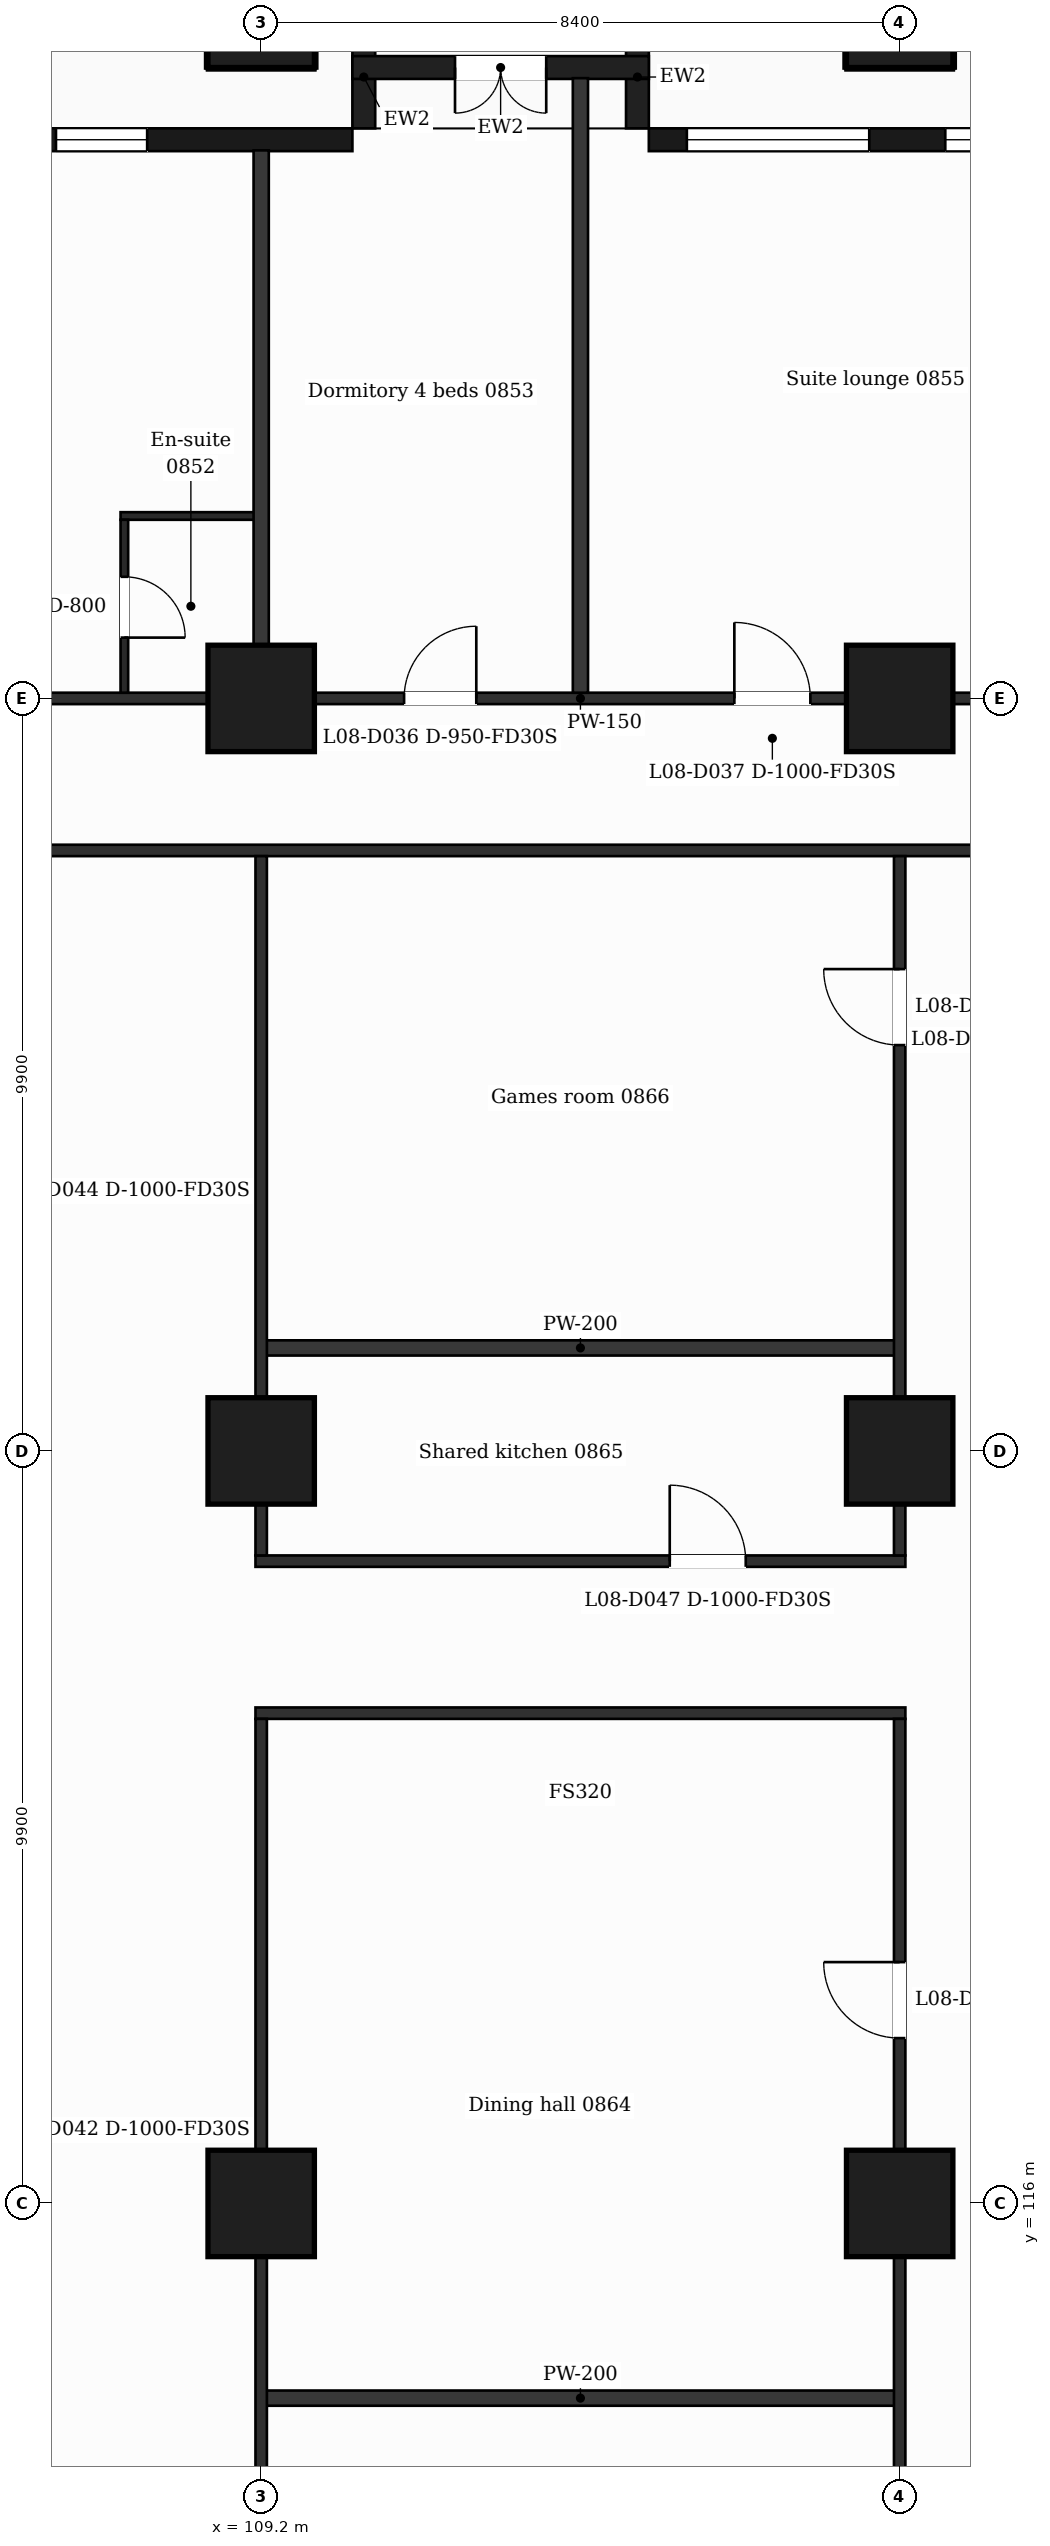
"""IFC4 building model, lengths in metres.
Left out: names, types, materials, properties, quantities, classifications, styles, units other than length and angle.
Written with IfcOpenShell. Run it as: python <this file> out.ifc"""

import sys

from ifc_helpers import new_model, si_unit, direction, frame, frame_2d, origin, origin_2d, place, context, subcontext, project, spatial, rectangle, extrude, element, fill, save


model = new_model("IFC4")
c1 = context("Model", 3, precision=1e-05, world=origin(), true_north=direction((0.0, 1.0)))
c2 = subcontext(c1, "Body", "Model", "MODEL_VIEW")
j1 = project(units=[si_unit("LENGTHUNIT", "METRE"), si_unit("PLANEANGLEUNIT", "RADIAN")], contexts=[c1])
p1 = place(None, origin())
s1 = spatial("IfcSite", under=j1, at=p1, CompositionType="ELEMENT")
p2 = place(p1, origin())
s2 = spatial("IfcBuilding", under=s1, at=p2, CompositionType="ELEMENT")
p3 = place(p2, frame((0.0, 0.0, 46.0)))
s3 = spatial("IfcBuildingStorey", under=s2, at=p3, CompositionType="ELEMENT", Elevation=46.0)
for number, where, z_axis, x_axis in (
    (1, (109.2, 116.0, 0.0), (0.0, 0.0, 1.0), (1.0, 0.0, 0.0)),
    (2, (117.6, 116.0, 0.0), (0.0, 0.0, 1.0), (1.0, 0.0, 0.0)),
    (3, (109.2, 125.9, 0.0), (0.0, 0.0, 1.0), (1.0, 0.0, 0.0)),
    (4, (117.6, 125.9, 0.0), (0.0, 0.0, 1.0), (1.0, 0.0, 0.0)),
    (5, (109.2, 135.8, 0.0), (0.0, 0.0, 1.0), (1.0, 0.0, 0.0)),
    (6, (117.6, 135.8, 0.0), (0.0, 0.0, 1.0), (1.0, 0.0, 0.0)),
    (7, (109.2, 144.8, 0.0), (0.0, 0.0, 1.0), (1.0, 0.0, 0.0)),
    (8, (117.6, 144.8, 0.0), (0.0, 0.0, 1.0), (1.0, 0.0, 0.0)),
):
    element("IfcColumn", number, at=place(p3, frame(where, z_axis=z_axis, x_axis=x_axis)), inside=s3, PredefinedType="COLUMN", context=c2, shape_type="SweptSolid", body=[
        extrude(rectangle(XDim=1.4, YDim=1.4, at=origin_2d()), origin(), (0.0, 0.0, 1.0), 3.5),
    ])
p4 = place(p3, frame((130.65, 143.15, 0.0), z_axis=(0.0, 0.0, 1.0), x_axis=(-1.0, 0.0, 0.0)))
e9 = element("IfcWall", 9, at=p4, inside=s3, PredefinedType="SOLIDWALL", context=c2, shape_type="SweptSolid", body=[
    extrude(rectangle(XDim=16.35, YDim=0.3, at=frame_2d((8.175, 0.0))), origin(), (0.0, 0.0, 1.0), 3.18),
])
p5 = place(p4, frame((1.35, 0.0, 0.9)))
e10 = element("IfcOpeningElement", 10, at=p5, cuts=e9, PredefinedType="OPENING", context=c2, shape_type="SweptSolid", body=[
    extrude(rectangle(XDim=2.4, YDim=2.1, at=frame_2d((1.2, 1.05))), frame((0.0, 0.16, 0.0), z_axis=(0.0, -1.0, 0.0), x_axis=(1.0, 0.0, 0.0)), (0.0, 0.0, 1.0), 0.32),
])
p6 = place(p4, frame((5.55, 0.0, 0.9)))
e11 = element("IfcOpeningElement", 11, at=p6, cuts=e9, PredefinedType="OPENING", context=c2, shape_type="SweptSolid", body=[
    extrude(rectangle(XDim=2.4, YDim=2.1, at=frame_2d((1.2, 1.05))), frame((0.0, 0.16, 0.0), z_axis=(0.0, -1.0, 0.0), x_axis=(1.0, 0.0, 0.0)), (0.0, 0.0, 1.0), 0.32),
])
p7 = place(p4, frame((9.45, 0.0, 0.0)))
e12 = element("IfcOpeningElement", 12, at=p7, cuts=e9, PredefinedType="OPENING", context=c2, shape_type="SweptSolid", body=[
    extrude(rectangle(XDim=1.2, YDim=2.4, at=frame_2d((0.6, 1.2))), frame((0.0, 0.16, 0.0), z_axis=(0.0, -1.0, 0.0), x_axis=(1.0, 0.0, 0.0)), (0.0, 0.0, 1.0), 0.32),
])
p8 = place(p4, frame((11.25, 0.0, 0.9)))
e13 = element("IfcOpeningElement", 13, at=p8, cuts=e9, PredefinedType="OPENING", context=c2, shape_type="SweptSolid", body=[
    extrude(rectangle(XDim=1.2, YDim=2.1, at=frame_2d((0.6, 1.05))), frame((0.0, 0.16, 0.0), z_axis=(0.0, -1.0, 0.0), x_axis=(1.0, 0.0, 0.0)), (0.0, 0.0, 1.0), 0.32),
])
p9 = place(p4, frame((13.45, 0.0, 0.9)))
e14 = element("IfcOpeningElement", 14, at=p9, cuts=e9, PredefinedType="OPENING", context=c2, shape_type="SweptSolid", body=[
    extrude(rectangle(XDim=2.4, YDim=2.1, at=frame_2d((1.2, 1.05))), frame((0.0, 0.16, 0.0), z_axis=(0.0, -1.0, 0.0), x_axis=(1.0, 0.0, 0.0)), (0.0, 0.0, 1.0), 0.32),
])
p10 = place(p3, frame((110.4, 143.15, 0.0), z_axis=(0.0, 0.0, 1.0), x_axis=(-1.0, 0.0, 0.0)))
e15 = element("IfcWall", 15, at=p10, inside=s3, PredefinedType="SOLIDWALL", context=c2, shape_type="SweptSolid", body=[
    extrude(rectangle(XDim=14.4, YDim=0.3, at=frame_2d((7.2, 0.0))), origin(), (0.0, 0.0, 1.0), 3.18),
])
p11 = place(p10, frame((2.7, 0.0, 0.9)))
e16 = element("IfcOpeningElement", 16, at=p11, cuts=e15, PredefinedType="OPENING", context=c2, shape_type="SweptSolid", body=[
    extrude(rectangle(XDim=1.2, YDim=2.1, at=frame_2d((0.6, 1.05))), frame((0.0, 0.16, 0.0), z_axis=(0.0, -1.0, 0.0), x_axis=(1.0, 0.0, 0.0)), (0.0, 0.0, 1.0), 0.32),
])
p12 = place(p10, frame((6.9, 0.0, 0.0)))
e17 = element("IfcOpeningElement", 17, at=p12, cuts=e15, PredefinedType="OPENING", context=c2, shape_type="SweptSolid", body=[
    extrude(rectangle(XDim=1.2, YDim=2.4, at=frame_2d((0.6, 1.2))), frame((0.0, 0.16, 0.0), z_axis=(0.0, -1.0, 0.0), x_axis=(1.0, 0.0, 0.0)), (0.0, 0.0, 1.0), 0.32),
])
p13 = place(p10, frame((10.5, 0.0, 0.9)))
e18 = element("IfcOpeningElement", 18, at=p13, cuts=e15, PredefinedType="OPENING", context=c2, shape_type="SweptSolid", body=[
    extrude(rectangle(XDim=2.4, YDim=2.1, at=frame_2d((1.2, 1.05))), frame((0.0, 0.16, 0.0), z_axis=(0.0, -1.0, 0.0), x_axis=(1.0, 0.0, 0.0)), (0.0, 0.0, 1.0), 0.32),
])
for number, where, z_axis, x_axis in (
    (19, (114.15, 143.3, 0.0), (0.0, 0.0, 1.0), (0.0, 1.0, 0.0)),
    (20, (110.55, 143.3, 0.0), (0.0, 0.0, 1.0), (0.0, 1.0, 0.0)),
):
    element("IfcWall", number, at=place(p3, frame(where, z_axis=z_axis, x_axis=x_axis)), inside=s3, PredefinedType="SOLIDWALL", context=c2, shape_type="SweptSolid", body=[
        extrude(rectangle(XDim=1.35, YDim=0.3, at=frame_2d((0.675, 0.0))), origin(), (0.0, 0.0, 1.0), 3.18),
    ])
p14 = place(p3, frame((114.3, 144.1, 0.0), z_axis=(0.0, 0.0, 1.0), x_axis=(-1.0, 0.0, 0.0)))
e21 = element("IfcWall", 21, at=p14, inside=s3, PredefinedType="SOLIDWALL", context=c2, shape_type="SweptSolid", body=[
    extrude(rectangle(XDim=3.9, YDim=0.3, at=frame_2d((1.95, 0.0))), origin(), (0.0, 0.0, 1.0), 3.18),
])
p15 = place(p14, frame((1.35, 0.0, 0.0)))
e22 = element("IfcOpeningElement", 22, at=p15, cuts=e21, PredefinedType="OPENING", context=c2, shape_type="SweptSolid", body=[
    extrude(rectangle(XDim=1.2, YDim=2.4, at=frame_2d((0.6, 1.2))), frame((0.0, 0.16, 0.0), z_axis=(0.0, -1.0, 0.0), x_axis=(1.0, 0.0, 0.0)), (0.0, 0.0, 1.0), 0.32),
])
p16 = place(p3, frame((109.2, 113.438, 0.0), z_axis=(0.0, 0.0, 1.0), x_axis=(1.0, 0.0, 0.0)))
e23 = element("IfcWall", 23, at=p16, inside=s3, PredefinedType="PARTITIONING", context=c2, shape_type="SweptSolid", body=[
    extrude(rectangle(XDim=8.4, YDim=0.2, at=frame_2d((4.2, 0.0))), origin(), (0.0, 0.0, 1.0), 3.18),
])
p17 = place(p3, frame((109.125, 122.45, 0.0), z_axis=(0.0, 0.0, 1.0), x_axis=(1.0, 0.0, 0.0)))
e24 = element("IfcWall", 24, at=p17, inside=s3, PredefinedType="PARTITIONING", context=c2, shape_type="SweptSolid", body=[
    extrude(rectangle(XDim=8.55, YDim=0.15, at=frame_2d((4.275, 0.0))), origin(), (0.0, 0.0, 1.0), 3.18),
])
p18 = place(p3, frame((109.125, 124.45, 0.0), z_axis=(0.0, 0.0, 1.0), x_axis=(1.0, 0.0, 0.0)))
e25 = element("IfcWall", 25, at=p18, inside=s3, PredefinedType="PARTITIONING", context=c2, shape_type="SweptSolid", body=[
    extrude(rectangle(XDim=8.55, YDim=0.15, at=frame_2d((4.275, 0.0))), origin(), (0.0, 0.0, 1.0), 3.18),
])
p19 = place(p18, frame((5.45, 0.0, 0.0)))
e26 = element("IfcOpeningElement", 26, at=p19, cuts=e25, PredefinedType="OPENING", context=c2, shape_type="SweptSolid", body=[
    extrude(rectangle(XDim=1.0, YDim=2.1, at=frame_2d((0.5, 1.05))), frame((0.0, 0.085, 0.0), z_axis=(0.0, -1.0, 0.0), x_axis=(1.0, 0.0, 0.0)), (0.0, 0.0, 1.0), 0.17),
])
p20 = place(p3, frame((109.2, 127.255, 0.0), z_axis=(0.0, 0.0, 1.0), x_axis=(1.0, 0.0, 0.0)))
e27 = element("IfcWall", 27, at=p20, inside=s3, PredefinedType="PARTITIONING", context=c2, shape_type="SweptSolid", body=[
    extrude(rectangle(XDim=8.4, YDim=0.2, at=frame_2d((4.2, 0.0))), origin(), (0.0, 0.0, 1.0), 3.18),
])
p21 = place(p3, frame((100.725, 133.8, 0.0), z_axis=(0.0, 0.0, 1.0), x_axis=(1.0, 0.0, 0.0)))
e28 = element("IfcWall", 28, at=p21, inside=s3, PredefinedType="PARTITIONING", context=c2, shape_type="SweptSolid", body=[
    extrude(rectangle(XDim=25.35, YDim=0.15, at=frame_2d((12.675, 0.0))), origin(), (0.0, 0.0, 1.0), 3.18),
])
p22 = place(p3, frame((90.895, 135.8, 0.0), z_axis=(0.0, 0.0, 1.0), x_axis=(1.0, 0.0, 0.0)))
e29 = element("IfcWall", 29, at=p22, inside=s3, PredefinedType="PARTITIONING", context=c2, shape_type="SweptSolid", body=[
    extrude(rectangle(XDim=45.011, YDim=0.15, at=frame_2d((22.505, 0.0))), origin(), (0.0, 0.0, 1.0), 3.18),
])
p23 = place(p22, frame((7.235, 0.0, 0.0)))
e30 = element("IfcOpeningElement", 30, at=p23, cuts=e29, PredefinedType="OPENING", context=c2, shape_type="SweptSolid", body=[
    extrude(rectangle(XDim=1.0, YDim=2.1, at=frame_2d((0.5, 1.05))), frame((0.0, 0.085, 0.0), z_axis=(0.0, -1.0, 0.0), x_axis=(1.0, 0.0, 0.0)), (0.0, 0.0, 1.0), 0.17),
])
p24 = place(p22, frame((12.73, 0.0, 0.0)))
e31 = element("IfcOpeningElement", 31, at=p24, cuts=e29, PredefinedType="OPENING", context=c2, shape_type="SweptSolid", body=[
    extrude(rectangle(XDim=0.95, YDim=2.1, at=frame_2d((0.475, 1.05))), frame((0.0, 0.085, 0.0), z_axis=(0.0, -1.0, 0.0), x_axis=(1.0, 0.0, 0.0)), (0.0, 0.0, 1.0), 0.17),
])
p25 = place(p22, frame((20.185, 0.0, 0.0)))
e32 = element("IfcOpeningElement", 32, at=p25, cuts=e29, PredefinedType="OPENING", context=c2, shape_type="SweptSolid", body=[
    extrude(rectangle(XDim=0.95, YDim=2.1, at=frame_2d((0.475, 1.05))), frame((0.0, 0.085, 0.0), z_axis=(0.0, -1.0, 0.0), x_axis=(1.0, 0.0, 0.0)), (0.0, 0.0, 1.0), 0.17),
])
p26 = place(p22, frame((24.531, 0.0, 0.0)))
e33 = element("IfcOpeningElement", 33, at=p26, cuts=e29, PredefinedType="OPENING", context=c2, shape_type="SweptSolid", body=[
    extrude(rectangle(XDim=1.0, YDim=2.1, at=frame_2d((0.5, 1.05))), frame((0.0, 0.085, 0.0), z_axis=(0.0, -1.0, 0.0), x_axis=(1.0, 0.0, 0.0)), (0.0, 0.0, 1.0), 0.17),
])
p27 = place(p22, frame((39.814, 0.0, 0.0)))
e34 = element("IfcOpeningElement", 34, at=p27, cuts=e29, PredefinedType="OPENING", context=c2, shape_type="SweptSolid", body=[
    extrude(rectangle(XDim=0.95, YDim=2.1, at=frame_2d((0.475, 1.05))), frame((0.0, 0.085, 0.0), z_axis=(0.0, -1.0, 0.0), x_axis=(1.0, 0.0, 0.0)), (0.0, 0.0, 1.0), 0.17),
])
p28 = place(p3, frame((107.35, 138.2, 0.0), z_axis=(0.0, 0.0, 1.0), x_axis=(1.0, 0.0, 0.0)))
e35 = element("IfcWall", 35, at=p28, inside=s3, PredefinedType="PARTITIONING", context=c2, shape_type="SweptSolid", body=[
    extrude(rectangle(XDim=1.85, YDim=0.1, at=frame_2d((0.925, 0.0))), origin(), (0.0, 0.0, 1.0), 3.18),
])
p29 = place(p3, frame((107.4, 135.875, 0.0), z_axis=(0.0, 0.0, 1.0), x_axis=(0.0, 1.0, 0.0)))
e36 = element("IfcWall", 36, at=p29, inside=s3, PredefinedType="PARTITIONING", context=c2, shape_type="SweptSolid", body=[
    extrude(rectangle(XDim=2.275, YDim=0.1, at=frame_2d((1.137, 0.0))), origin(), (0.0, 0.0, 1.0), 3.18),
])
p30 = place(p29, frame((0.725, 0.0, 0.0)))
e37 = element("IfcOpeningElement", 37, at=p30, cuts=e36, PredefinedType="OPENING", context=c2, shape_type="SweptSolid", body=[
    extrude(rectangle(XDim=0.8, YDim=2.1, at=frame_2d((0.4, 1.05))), frame((0.0, 0.06, 0.0), z_axis=(0.0, -1.0, 0.0), x_axis=(1.0, 0.0, 0.0)), (0.0, 0.0, 1.0), 0.12),
])
p31 = place(p3, frame((109.2, 135.875, 0.0), z_axis=(0.0, 0.0, 1.0), x_axis=(0.0, 1.0, 0.0)))
e38 = element("IfcWall", 38, at=p31, inside=s3, PredefinedType="PARTITIONING", context=c2, shape_type="SweptSolid", body=[
    extrude(rectangle(XDim=7.135, YDim=0.2, at=frame_2d((3.567, 0.0))), origin(), (0.0, 0.0, 1.0), 3.18),
])
p32 = place(p3, frame((109.2, 109.075, 0.0), z_axis=(0.0, 0.0, 1.0), x_axis=(0.0, 1.0, 0.0)))
e39 = element("IfcWall", 39, at=p32, inside=s3, PredefinedType="PARTITIONING", context=c2, shape_type="SweptSolid", body=[
    extrude(rectangle(XDim=13.3, YDim=0.15, at=frame_2d((6.65, 0.0))), origin(), (0.0, 0.0, 1.0), 3.18),
])
p33 = place(p3, frame((109.2, 124.525, 0.0), z_axis=(0.0, 0.0, 1.0), x_axis=(0.0, 1.0, 0.0)))
e40 = element("IfcWall", 40, at=p33, inside=s3, PredefinedType="PARTITIONING", context=c2, shape_type="SweptSolid", body=[
    extrude(rectangle(XDim=9.2, YDim=0.15, at=frame_2d((4.6, 0.0))), origin(), (0.0, 0.0, 1.0), 3.18),
])
p34 = place(p3, frame((113.4, 135.875, 0.0), z_axis=(0.0, 0.0, 1.0), x_axis=(0.0, 1.0, 0.0)))
e41 = element("IfcWall", 41, at=p34, inside=s3, PredefinedType="PARTITIONING", context=c2, shape_type="SweptSolid", body=[
    extrude(rectangle(XDim=8.085, YDim=0.2, at=frame_2d((4.042, 0.0))), origin(), (0.0, 0.0, 1.0), 3.18),
])
p35 = place(p3, frame((117.6, 109.075, 0.0), z_axis=(0.0, 0.0, 1.0), x_axis=(0.0, 1.0, 0.0)))
e42 = element("IfcWall", 42, at=p35, inside=s3, PredefinedType="PARTITIONING", context=c2, shape_type="SweptSolid", body=[
    extrude(rectangle(XDim=13.3, YDim=0.15, at=frame_2d((6.65, 0.0))), origin(), (0.0, 0.0, 1.0), 3.18),
])
p36 = place(p35, frame((9.1, 0.0, 0.0)))
e43 = element("IfcOpeningElement", 43, at=p36, cuts=e42, PredefinedType="OPENING", context=c2, shape_type="SweptSolid", body=[
    extrude(rectangle(XDim=1.0, YDim=2.1, at=frame_2d((0.5, 1.05))), frame((0.0, 0.085, 0.0), z_axis=(0.0, -1.0, 0.0), x_axis=(1.0, 0.0, 0.0)), (0.0, 0.0, 1.0), 0.17),
])
p37 = place(p3, frame((117.6, 124.525, 0.0), z_axis=(0.0, 0.0, 1.0), x_axis=(0.0, 1.0, 0.0)))
e44 = element("IfcWall", 44, at=p37, inside=s3, PredefinedType="PARTITIONING", context=c2, shape_type="SweptSolid", body=[
    extrude(rectangle(XDim=9.2, YDim=0.15, at=frame_2d((4.6, 0.0))), origin(), (0.0, 0.0, 1.0), 3.18),
])
p38 = place(p37, frame((6.714, 0.0, 0.0)))
e45 = element("IfcOpeningElement", 45, at=p38, cuts=e44, PredefinedType="OPENING", context=c2, shape_type="SweptSolid", body=[
    extrude(rectangle(XDim=1.0, YDim=2.1, at=frame_2d((0.5, 1.05))), frame((0.0, 0.085, 0.0), z_axis=(0.0, -1.0, 0.0), x_axis=(1.0, 0.0, 0.0)), (0.0, 0.0, 1.0), 0.17),
])
p39 = place(p8, origin())
e46 = element("IfcWindow", 46, at=p39, inside=s3, PartitioningType="SINGLE_PANEL", PredefinedType="WINDOW", context=c2, shape_type="SweptSolid", body=[
    extrude(rectangle(XDim=1.2, YDim=2.1, at=frame_2d((0.6, 1.05))), frame((0.0, 0.03, 0.0), z_axis=(0.0, -1.0, 0.0), x_axis=(1.0, 0.0, 0.0)), (0.0, 0.0, 1.0), 0.06),
])
fill(e13, e46)
p40 = place(p9, origin())
e47 = element("IfcWindow", 47, at=p40, inside=s3, PartitioningType="SINGLE_PANEL", PredefinedType="WINDOW", context=c2, shape_type="SweptSolid", body=[
    extrude(rectangle(XDim=2.4, YDim=2.1, at=frame_2d((1.2, 1.05))), frame((0.0, 0.03, 0.0), z_axis=(0.0, -1.0, 0.0), x_axis=(1.0, 0.0, 0.0)), (0.0, 0.0, 1.0), 0.06),
])
fill(e14, e47)
p41 = place(p11, origin())
e48 = element("IfcWindow", 48, at=p41, inside=s3, PartitioningType="SINGLE_PANEL", PredefinedType="WINDOW", context=c2, shape_type="SweptSolid", body=[
    extrude(rectangle(XDim=1.2, YDim=2.1, at=frame_2d((0.6, 1.05))), frame((0.0, 0.03, 0.0), z_axis=(0.0, -1.0, 0.0), x_axis=(1.0, 0.0, 0.0)), (0.0, 0.0, 1.0), 0.06),
])
fill(e16, e48)
p42 = place(p15, origin())
e49 = element("IfcDoor", 49, at=p42, inside=s3, OperationType="DOUBLE_DOOR_SINGLE_SWING", PredefinedType="DOOR", context=c2, shape_type="SweptSolid", body=[
    extrude(rectangle(XDim=1.2, YDim=2.4, at=frame_2d((0.6, 1.2))), frame((0.0, 0.025, 0.0), z_axis=(0.0, -1.0, 0.0), x_axis=(1.0, 0.0, 0.0)), (0.0, 0.0, 1.0), 0.05),
])
fill(e22, e49)
p43 = place(p30, origin())
e50 = element("IfcDoor", 50, at=p43, inside=s3, OperationType="SINGLE_SWING_LEFT", PredefinedType="DOOR", context=c2, shape_type="SweptSolid", body=[
    extrude(rectangle(XDim=0.8, YDim=2.1, at=frame_2d((0.4, 1.05))), frame((0.0, 0.025, 0.0), z_axis=(0.0, -1.0, 0.0), x_axis=(1.0, 0.0, 0.0)), (0.0, 0.0, 1.0), 0.05),
])
fill(e37, e50)
p44 = place(p25, origin())
e51 = element("IfcDoor", 51, at=p44, inside=s3, OperationType="SINGLE_SWING_RIGHT", PredefinedType="DOOR", context=c2, shape_type="SweptSolid", body=[
    extrude(rectangle(XDim=0.95, YDim=2.1, at=frame_2d((0.475, 1.05))), frame((0.0, 0.025, 0.0), z_axis=(0.0, -1.0, 0.0), x_axis=(1.0, 0.0, 0.0)), (0.0, 0.0, 1.0), 0.05),
])
fill(e32, e51)
p45 = place(p26, origin())
e52 = element("IfcDoor", 52, at=p45, inside=s3, OperationType="SINGLE_SWING_LEFT", PredefinedType="DOOR", context=c2, shape_type="SweptSolid", body=[
    extrude(rectangle(XDim=1.0, YDim=2.1, at=frame_2d((0.5, 1.05))), frame((0.0, 0.025, 0.0), z_axis=(0.0, -1.0, 0.0), x_axis=(1.0, 0.0, 0.0)), (0.0, 0.0, 1.0), 0.05),
])
fill(e33, e52)
p46 = place(p36, origin())
e53 = element("IfcDoor", 53, at=p46, inside=s3, OperationType="SINGLE_SWING_RIGHT", PredefinedType="DOOR", context=c2, shape_type="SweptSolid", body=[
    extrude(rectangle(XDim=1.0, YDim=2.1, at=frame_2d((0.5, 1.05))), frame((0.0, 0.025, 0.0), z_axis=(0.0, -1.0, 0.0), x_axis=(1.0, 0.0, 0.0)), (0.0, 0.0, 1.0), 0.05),
])
fill(e43, e53)
p47 = place(p19, origin())
e54 = element("IfcDoor", 54, at=p47, inside=s3, OperationType="SINGLE_SWING_LEFT", PredefinedType="DOOR", context=c2, shape_type="SweptSolid", body=[
    extrude(rectangle(XDim=1.0, YDim=2.1, at=frame_2d((0.5, 1.05))), frame((0.0, 0.025, 0.0), z_axis=(0.0, -1.0, 0.0), x_axis=(1.0, 0.0, 0.0)), (0.0, 0.0, 1.0), 0.05),
])
fill(e26, e54)
p48 = place(p38, origin())
e55 = element("IfcDoor", 55, at=p48, inside=s3, OperationType="SINGLE_SWING_RIGHT", PredefinedType="DOOR", context=c2, shape_type="SweptSolid", body=[
    extrude(rectangle(XDim=1.0, YDim=2.1, at=frame_2d((0.5, 1.05))), frame((0.0, 0.025, 0.0), z_axis=(0.0, -1.0, 0.0), x_axis=(1.0, 0.0, 0.0)), (0.0, 0.0, 1.0), 0.05),
])
fill(e45, e55)
save(model, sys.argv[1])
